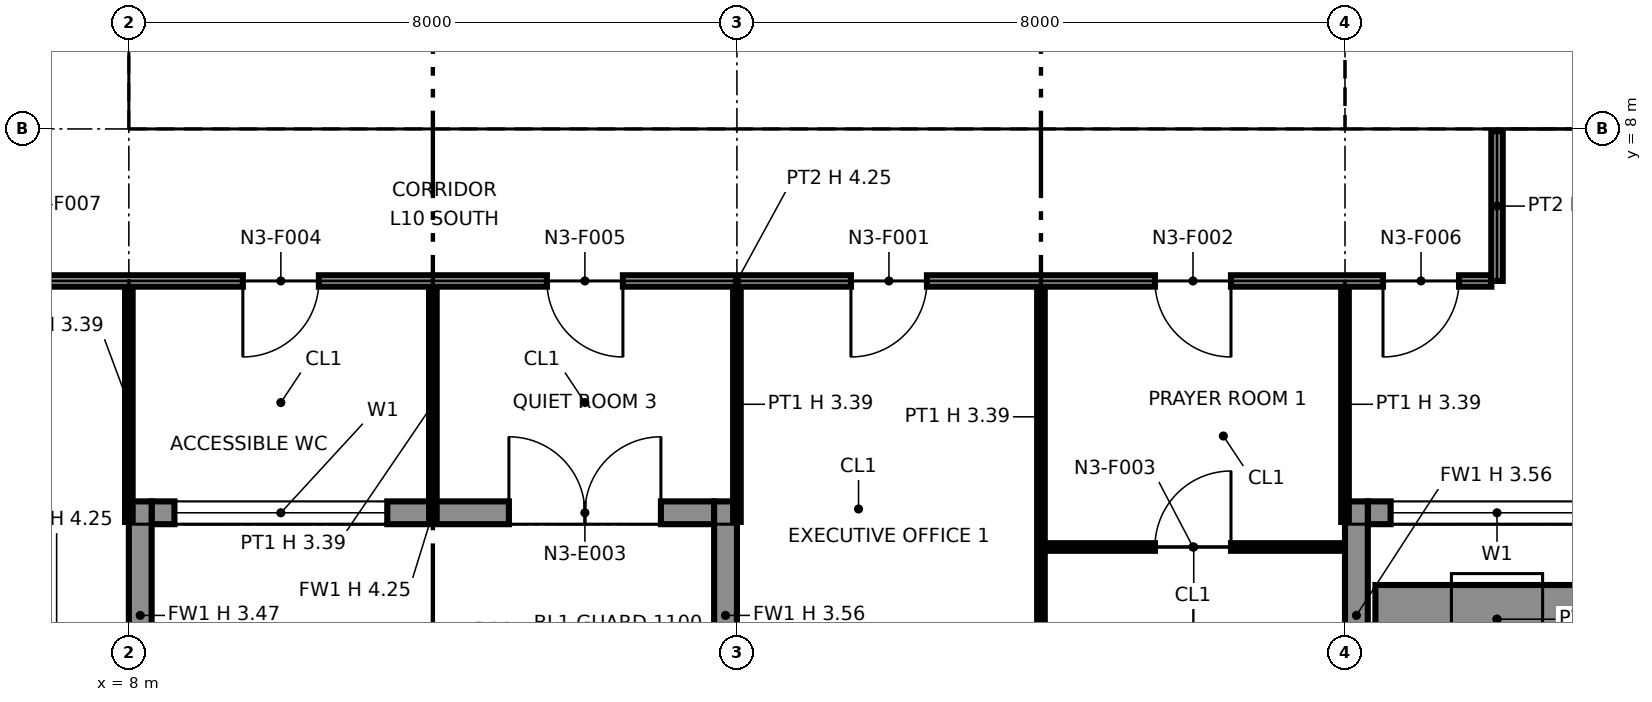
"""IFC4 building model, lengths in metres.
Left out: names, types, materials, properties, quantities, classifications, styles, units other than length and angle.
Written with IfcOpenShell. Run it as: python <this file> out.ifc"""

import sys

from ifc_helpers import new_model, si_unit, direction, frame, frame_2d, origin, origin_2d, place, context, subcontext, project, spatial, polyline, rectangle, i_section, outline, extrude, element, fill, save


model = new_model("IFC4")
c1 = context("Model", 3, precision=1e-05, world=origin(), true_north=direction((0.0, 1.0)))
c2 = subcontext(c1, "Body", "Model", "MODEL_VIEW")
j1 = project(units=[si_unit("LENGTHUNIT", "METRE"), si_unit("PLANEANGLEUNIT", "RADIAN")], contexts=[c1])
p1 = place(None, origin())
s1 = spatial("IfcSite", under=j1, at=p1, CompositionType="ELEMENT")
p2 = place(p1, origin())
s2 = spatial("IfcBuilding", under=s1, at=p2, CompositionType="ELEMENT")
p3 = place(p2, frame((0.0, 0.0, 61.2)))
s3 = spatial("IfcBuildingStorey", under=s2, at=p3, CompositionType="ELEMENT", Elevation=61.2)
for number, where, z_axis, x_axis in (
    (1, (8.0, 8.0, 0.0), (0.0, 0.0, 1.0), (1.0, 0.0, 0.0)),
    (2, (16.0, 8.0, 0.0), (0.0, 0.0, 1.0), (1.0, 0.0, 0.0)),
):
    element("IfcColumn", number, at=place(p3, frame(where, z_axis=z_axis, x_axis=x_axis)), inside=s3, PredefinedType="COLUMN", context=c2, shape_type="SweptSolid", body=[
        extrude(i_section(OverallWidth=0.419, OverallDepth=0.455, WebThickness=0.042, FlangeThickness=0.068, at=origin_2d()), origin(), (0.0, 0.0, 1.0), 4.25),
    ])
p4 = place(p3, frame((24.0, 8.0, 0.0), z_axis=(0.0, 0.0, 1.0), x_axis=(1.0, 0.0, 0.0)))
e3 = element("IfcColumn", 3, at=p4, inside=s3, PredefinedType="COLUMN", context=c2, shape_type="SweptSolid", body=[
    extrude(i_section(OverallWidth=0.424, OverallDepth=0.475, WebThickness=0.048, FlangeThickness=0.077, at=origin_2d()), origin(), (0.0, 0.0, 1.0), 4.25),
])
p5 = place(p3, frame((8.3, 2.95, 0.0), z_axis=(0.0, 0.0, 1.0), x_axis=(1.0, 0.0, 0.0)))
e4 = element("IfcWall", 4, at=p5, inside=s3, PredefinedType="SOLIDWALL", context=c2, shape_type="SweptSolid", body=[
    extrude(rectangle(XDim=7.4, YDim=0.3, at=frame_2d((3.7, 0.0))), origin(), (0.0, 0.0, 1.0), 4.25),
])
p6 = place(p5, frame((0.3, 0.0, 0.9)))
e5 = element("IfcOpeningElement", 5, at=p6, cuts=e4, PredefinedType="OPENING", context=c2, shape_type="SweptSolid", body=[
    extrude(rectangle(XDim=2.8, YDim=2.2, at=frame_2d((1.4, 1.1))), frame((0.0, 0.16, 0.0), z_axis=(0.0, -1.0, 0.0), x_axis=(1.0, 0.0, 0.0)), (0.0, 0.0, 1.0), 0.32),
])
p7 = place(p5, frame((4.7, 0.0, 0.0)))
e6 = element("IfcOpeningElement", 6, at=p7, cuts=e4, PredefinedType="OPENING", context=c2, shape_type="SweptSolid", body=[
    extrude(rectangle(XDim=2.0, YDim=2.4, at=frame_2d((1.0, 1.2))), frame((0.0, 0.16, 0.0), z_axis=(0.0, -1.0, 0.0), x_axis=(1.0, 0.0, 0.0)), (0.0, 0.0, 1.0), 0.32),
])
p8 = place(p3, frame((8.15, 0.1, 0.0), z_axis=(0.0, 0.0, 1.0), x_axis=(0.0, 1.0, 0.0)))
e7 = element("IfcWall", 7, at=p8, inside=s3, PredefinedType="SOLIDWALL", context=c2, shape_type="SweptSolid", body=[
    extrude(rectangle(XDim=3.0, YDim=0.3, at=frame_2d((1.5, 0.0))), origin(), (0.0, 0.0, 1.0), 3.469),
])
p9 = place(p3, frame((15.85, 0.1, 0.0), z_axis=(0.0, 0.0, 1.0), x_axis=(0.0, 1.0, 0.0)))
e8 = element("IfcWall", 8, at=p9, inside=s3, PredefinedType="SOLIDWALL", context=c2, shape_type="SweptSolid", body=[
    extrude(rectangle(XDim=3.0, YDim=0.3, at=frame_2d((1.5, 0.0))), origin(), (0.0, 0.0, 1.0), 3.556),
])
p10 = place(p3, frame((24.3, 2.95, 0.0), z_axis=(0.0, 0.0, 1.0), x_axis=(1.0, 0.0, 0.0)))
e9 = element("IfcWall", 9, at=p10, inside=s3, PredefinedType="SOLIDWALL", context=c2, shape_type="SweptSolid", body=[
    extrude(rectangle(XDim=7.4, YDim=0.3, at=frame_2d((3.7, 0.0))), origin(), (0.0, 0.0, 1.0), 4.25),
])
p11 = place(p10, frame((0.3, 0.0, 0.9)))
e10 = element("IfcOpeningElement", 10, at=p11, cuts=e9, PredefinedType="OPENING", context=c2, shape_type="SweptSolid", body=[
    extrude(rectangle(XDim=2.8, YDim=2.2, at=frame_2d((1.4, 1.1))), frame((0.0, 0.16, 0.0), z_axis=(0.0, -1.0, 0.0), x_axis=(1.0, 0.0, 0.0)), (0.0, 0.0, 1.0), 0.32),
])
p12 = place(p10, frame((4.7, 0.0, 0.0)))
e11 = element("IfcOpeningElement", 11, at=p12, cuts=e9, PredefinedType="OPENING", context=c2, shape_type="SweptSolid", body=[
    extrude(rectangle(XDim=2.0, YDim=2.4, at=frame_2d((1.0, 1.2))), frame((0.0, 0.16, 0.0), z_axis=(0.0, -1.0, 0.0), x_axis=(1.0, 0.0, 0.0)), (0.0, 0.0, 1.0), 0.32),
])
p13 = place(p3, frame((24.15, 0.1, 0.0), z_axis=(0.0, 0.0, 1.0), x_axis=(0.0, 1.0, 0.0)))
e12 = element("IfcWall", 12, at=p13, inside=s3, PredefinedType="SOLIDWALL", context=c2, shape_type="SweptSolid", body=[
    extrude(rectangle(XDim=3.0, YDim=0.3, at=frame_2d((1.5, 0.0))), origin(), (0.0, 0.0, 1.0), 3.556),
])
p14 = place(p3, frame((24.4, 1.55, 0.0), z_axis=(0.0, 0.0, 1.0), x_axis=(1.0, 0.0, 0.0)))
e13 = element("IfcWall", 13, at=p14, inside=s3, PredefinedType="SOLIDWALL", context=c2, shape_type="SweptSolid", body=[
    extrude(rectangle(XDim=3.2, YDim=0.9, at=frame_2d((1.6, 0.0))), origin(), (0.0, 0.0, 1.0), 0.6),
])
p15 = place(p3, frame((8.65, 8.75, 0.0), z_axis=(0.0, 0.0, 1.0), x_axis=(1.0, 0.0, 0.0)))
e14 = element("IfcWall", 14, at=p15, inside=s3, PredefinedType="PARTITIONING", context=c2, shape_type="SweptSolid", body=[
    extrude(outline(polyline([(0.0, 0.0), (14.7, 0.0), (14.7, 4.25), (7.469, 4.25), (7.469, 3.632), (7.231, 3.632), (7.23, 4.25), (0.0, 4.25), (0.0, 0.0)])), frame((0.0, 0.1, 0.0), z_axis=(0.0, -1.0, 0.0), x_axis=(1.0, 0.0, 0.0)), (0.0, 0.0, 1.0), 0.2),
])
p16 = place(p15, frame((1.3, 0.0, 0.0)))
e15 = element("IfcOpeningElement", 15, at=p16, cuts=e14, PredefinedType="OPENING", context=c2, shape_type="SweptSolid", body=[
    extrude(rectangle(XDim=1.4, YDim=2.1, at=frame_2d((0.7, 1.05))), frame((0.0, 0.11, 0.0), z_axis=(0.0, -1.0, 0.0), x_axis=(1.0, 0.0, 0.0)), (0.0, 0.0, 1.0), 0.22),
])
p17 = place(p15, frame((4.6, 0.0, 0.0)))
e16 = element("IfcOpeningElement", 16, at=p17, cuts=e14, PredefinedType="OPENING", context=c2, shape_type="SweptSolid", body=[
    extrude(rectangle(XDim=1.4, YDim=2.1, at=frame_2d((0.7, 1.05))), frame((0.0, 0.11, 0.0), z_axis=(0.0, -1.0, 0.0), x_axis=(1.0, 0.0, 0.0)), (0.0, 0.0, 1.0), 0.22),
])
p18 = place(p15, frame((10.4, 0.0, 0.0)))
e17 = element("IfcOpeningElement", 17, at=p18, cuts=e14, PredefinedType="OPENING", context=c2, shape_type="SweptSolid", body=[
    extrude(rectangle(XDim=1.2, YDim=2.1, at=frame_2d((0.6, 1.05))), frame((0.0, 0.11, 0.0), z_axis=(0.0, -1.0, 0.0), x_axis=(1.0, 0.0, 0.0)), (0.0, 0.0, 1.0), 0.22),
])
p19 = place(p3, frame((8.75, 8.85, 0.0), z_axis=(0.0, 0.0, 1.0), x_axis=(0.0, 1.0, 0.0)))
e18 = element("IfcWall", 18, at=p19, inside=s3, PredefinedType="PARTITIONING", context=c2, shape_type="SweptSolid", body=[
    extrude(outline(polyline([(0.0, 0.0), (14.3, 0.0), (14.3, 4.25), (10.231, 4.25), (10.23, 3.789), (10.07, 3.789), (10.069, 4.25), (7.27, 4.25), (7.269, 3.632), (7.031, 3.632), (7.031, 4.25), (0.0, 4.25), (0.0, 0.0)])), frame((0.0, 0.1, 0.0), z_axis=(0.0, -1.0, 0.0), x_axis=(1.0, 0.0, 0.0)), (0.0, 0.0, 1.0), 0.2),
])
p20 = place(p19, frame((8.3, 0.0, 0.0)))
e19 = element("IfcOpeningElement", 19, at=p20, cuts=e18, PredefinedType="OPENING", context=c2, shape_type="SweptSolid", body=[
    extrude(rectangle(XDim=1.8, YDim=2.1, at=frame_2d((0.9, 1.05))), frame((0.0, 0.11, 0.0), z_axis=(0.0, -1.0, 0.0), x_axis=(1.0, 0.0, 0.0)), (0.0, 0.0, 1.0), 0.22),
])
p21 = place(p3, frame((12.4, 8.85, 0.0), z_axis=(0.0, 0.0, 1.0), x_axis=(0.0, 1.0, 0.0)))
e20 = element("IfcWall", 20, at=p21, inside=s3, PredefinedType="PARTITIONING", context=c2, shape_type="SweptSolid", body=[
    extrude(rectangle(XDim=6.85, YDim=0.2, at=frame_2d((3.425, 0.0))), origin(), (0.0, 0.0, 1.0), 4.25),
])
p22 = place(p3, frame((15.85, 8.85, 0.0), z_axis=(0.0, 0.0, 1.0), x_axis=(0.0, 1.0, 0.0)))
e21 = element("IfcWall", 21, at=p22, inside=s3, PredefinedType="PARTITIONING", context=c2, shape_type="SweptSolid", body=[
    extrude(rectangle(XDim=1.55, YDim=0.9, at=frame_2d((0.775, 0.0))), origin(), (0.0, 0.0, 1.0), 3.632),
])
p23 = place(p22, frame((0.3, 0.0, 0.0)))
e22 = element("IfcOpeningElement", 22, at=p23, cuts=e21, PredefinedType="OPENING", context=c2, shape_type="SweptSolid", body=[
    extrude(rectangle(XDim=1.1, YDim=2.1, at=frame_2d((0.55, 1.05))), frame((0.0, 0.46, 0.0), z_axis=(0.0, -1.0, 0.0), x_axis=(1.0, 0.0, 0.0)), (0.0, 0.0, 1.0), 0.92),
])
p24 = place(p3, frame((23.25, 8.85, 0.0), z_axis=(0.0, 0.0, 1.0), x_axis=(0.0, 1.0, 0.0)))
e23 = element("IfcWall", 23, at=p24, inside=s3, PredefinedType="PARTITIONING", context=c2, shape_type="SweptSolid", body=[
    extrude(outline(polyline([(0.0, 0.0), (14.3, 0.0), (14.3, 4.25), (11.231, 4.25), (11.23, 3.789), (11.07, 3.789), (11.069, 4.25), (7.27, 4.25), (7.269, 3.632), (7.031, 3.632), (7.031, 4.25), (1.231, 4.25), (1.23, 3.789), (1.07, 3.789), (1.069, 4.25), (0.0, 4.25), (0.0, 0.0)])), frame((0.0, 0.1, 0.0), z_axis=(0.0, -1.0, 0.0), x_axis=(1.0, 0.0, 0.0)), (0.0, 0.0, 1.0), 0.2),
])
p25 = place(p24, frame((8.3, 0.0, 0.0)))
e24 = element("IfcOpeningElement", 24, at=p25, cuts=e23, PredefinedType="OPENING", context=c2, shape_type="SweptSolid", body=[
    extrude(rectangle(XDim=1.8, YDim=2.1, at=frame_2d((0.9, 1.05))), frame((0.0, 0.11, 0.0), z_axis=(0.0, -1.0, 0.0), x_axis=(1.0, 0.0, 0.0)), (0.0, 0.0, 1.0), 0.22),
])
p26 = place(p3, frame((24.65, 8.75, 0.0), z_axis=(0.0, 0.0, 1.0), x_axis=(1.0, 0.0, 0.0)))
e25 = element("IfcWall", 25, at=p26, inside=s3, PredefinedType="PARTITIONING", context=c2, shape_type="SweptSolid", body=[
    extrude(outline(polyline([(0.0, 0.0), (14.7, 0.0), (14.7, 4.25), (7.469, 4.25), (7.469, 3.632), (7.231, 3.632), (7.23, 4.25), (0.0, 4.25), (0.0, 0.0)])), frame((0.0, 0.1, 0.0), z_axis=(0.0, -1.0, 0.0), x_axis=(1.0, 0.0, 0.0)), (0.0, 0.0, 1.0), 0.2),
])
p27 = place(p3, frame((24.75, 8.85, 0.0), z_axis=(0.0, 0.0, 1.0), x_axis=(0.0, 1.0, 0.0)))
e26 = element("IfcWall", 26, at=p27, inside=s3, PredefinedType="PARTITIONING", context=c2, shape_type="SweptSolid", body=[
    extrude(outline(polyline([(0.0, 0.0), (6.3, 0.0), (6.3, 4.25), (3.231, 4.25), (3.23, 3.789), (3.07, 3.789), (3.069, 4.25), (0.0, 4.25), (0.0, 0.0)])), frame((0.0, 0.1, 0.0), z_axis=(0.0, -1.0, 0.0), x_axis=(1.0, 0.0, 0.0)), (0.0, 0.0, 1.0), 0.2),
])
p28 = place(p3, frame((20.0, 0.13, 0.0), z_axis=(0.0, 0.0, 1.0), x_axis=(0.0, 1.0, 0.0)))
e27 = element("IfcWall", 27, at=p28, inside=s3, PredefinedType="PARTITIONING", context=c2, shape_type="SweptSolid", body=[
    extrude(rectangle(XDim=2.32, YDim=0.1, at=frame_2d((1.16, 0.0))), origin(), (0.0, 0.0, 1.0), 4.25),
])
p29 = place(p3, frame((20.05, 2.5, 0.0), z_axis=(0.0, 0.0, 1.0), x_axis=(1.0, 0.0, 0.0)))
e28 = element("IfcWall", 28, at=p29, inside=s3, PredefinedType="PARTITIONING", context=c2, shape_type="SweptSolid", body=[
    extrude(rectangle(XDim=3.92, YDim=0.1, at=frame_2d((1.96, 0.0))), origin(), (0.0, 0.0, 1.0), 4.25),
])
p30 = place(p29, frame((1.45, 0.0, 0.0)))
e29 = element("IfcOpeningElement", 29, at=p30, cuts=e28, PredefinedType="OPENING", context=c2, shape_type="SweptSolid", body=[
    extrude(rectangle(XDim=1.0, YDim=2.1, at=frame_2d((0.5, 1.05))), frame((0.0, 0.06, 0.0), z_axis=(0.0, -1.0, 0.0), x_axis=(1.0, 0.0, 0.0)), (0.0, 0.0, 1.0), 0.12),
])
p31 = place(p3, frame((20.0, 2.5, 0.0), z_axis=(0.0, 0.0, 1.0), x_axis=(0.0, 1.0, 0.0)))
e30 = element("IfcWall", 30, at=p31, inside=s3, PredefinedType="PARTITIONING", context=c2, shape_type="SweptSolid", body=[
    extrude(rectangle(XDim=3.425, YDim=0.1, at=frame_2d((1.712, 0.0))), origin(), (0.0, 0.0, 1.0), 3.391),
])
for number, where, z_axis, x_axis in (
    (31, (8.0, 2.83, 0.0), (0.0, 0.0, 1.0), (0.0, 1.0, 0.0)),
    (32, (12.0, 2.83, 0.0), (0.0, 0.0, 1.0), (0.0, 1.0, 0.0)),
    (33, (16.0, 2.83, 0.0), (0.0, 0.0, 1.0), (0.0, 1.0, 0.0)),
    (34, (24.0, 2.83, 0.0), (0.0, 0.0, 1.0), (0.0, 1.0, 0.0)),
):
    element("IfcWall", number, at=place(p3, frame(where, z_axis=z_axis, x_axis=x_axis)), inside=s3, PredefinedType="PARTITIONING", context=c2, shape_type="SweptSolid", body=[
        extrude(rectangle(XDim=3.095, YDim=0.1, at=frame_2d((1.547, 0.0))), origin(), (0.0, 0.0, 1.0), 3.391),
    ])
p32 = place(p3, frame((6.075, 6.0, 0.0), z_axis=(0.0, 0.0, 1.0), x_axis=(1.0, 0.0, 0.0)))
e35 = element("IfcWall", 35, at=p32, inside=s3, PredefinedType="PARTITIONING", context=c2, shape_type="SweptSolid", body=[
    extrude(rectangle(XDim=19.85, YDim=0.15, at=frame_2d((9.925, 0.0))), origin(), (0.0, 0.0, 1.0), 4.25),
])
p33 = place(p32, frame((12.425, 0.0, 0.0), z_axis=(0.0, 0.0, 1.0), x_axis=(-1.0, 0.0, 0.0)))
e36 = element("IfcOpeningElement", 36, at=p33, cuts=e35, PredefinedType="OPENING", context=c2, shape_type="SweptSolid", body=[
    extrude(rectangle(XDim=1.0, YDim=2.1, at=frame_2d((0.5, 1.05))), frame((0.0, 0.085, 0.0), z_axis=(0.0, -1.0, 0.0), x_axis=(1.0, 0.0, 0.0)), (0.0, 0.0, 1.0), 0.17),
])
p34 = place(p32, frame((16.425, 0.0, 0.0), z_axis=(0.0, 0.0, 1.0), x_axis=(-1.0, 0.0, 0.0)))
e37 = element("IfcOpeningElement", 37, at=p34, cuts=e35, PredefinedType="OPENING", context=c2, shape_type="SweptSolid", body=[
    extrude(rectangle(XDim=1.0, YDim=2.1, at=frame_2d((0.5, 1.05))), frame((0.0, 0.085, 0.0), z_axis=(0.0, -1.0, 0.0), x_axis=(1.0, 0.0, 0.0)), (0.0, 0.0, 1.0), 0.17),
])
p35 = place(p32, frame((4.425, 0.0, 0.0), z_axis=(0.0, 0.0, 1.0), x_axis=(-1.0, 0.0, 0.0)))
e38 = element("IfcOpeningElement", 38, at=p35, cuts=e35, PredefinedType="OPENING", context=c2, shape_type="SweptSolid", body=[
    extrude(rectangle(XDim=1.0, YDim=2.1, at=frame_2d((0.5, 1.05))), frame((0.0, 0.085, 0.0), z_axis=(0.0, -1.0, 0.0), x_axis=(1.0, 0.0, 0.0)), (0.0, 0.0, 1.0), 0.17),
])
p36 = place(p32, frame((8.425, 0.0, 0.0), z_axis=(0.0, 0.0, 1.0), x_axis=(-1.0, 0.0, 0.0)))
e39 = element("IfcOpeningElement", 39, at=p36, cuts=e35, PredefinedType="OPENING", context=c2, shape_type="SweptSolid", body=[
    extrude(rectangle(XDim=1.0, YDim=2.1, at=frame_2d((0.5, 1.05))), frame((0.0, 0.085, 0.0), z_axis=(0.0, -1.0, 0.0), x_axis=(1.0, 0.0, 0.0)), (0.0, 0.0, 1.0), 0.17),
])
p37 = place(p32, frame((19.425, 0.0, 0.0), z_axis=(0.0, 0.0, 1.0), x_axis=(-1.0, 0.0, 0.0)))
e40 = element("IfcOpeningElement", 40, at=p37, cuts=e35, PredefinedType="OPENING", context=c2, shape_type="SweptSolid", body=[
    extrude(rectangle(XDim=1.0, YDim=2.1, at=frame_2d((0.5, 1.05))), frame((0.0, 0.085, 0.0), z_axis=(0.0, -1.0, 0.0), x_axis=(1.0, 0.0, 0.0)), (0.0, 0.0, 1.0), 0.17),
])
p38 = place(p3, frame((26.0, 6.0, 0.0), z_axis=(0.0, 0.0, 1.0), x_axis=(0.0, 1.0, 0.0)))
e41 = element("IfcWall", 41, at=p38, inside=s3, PredefinedType="PARTITIONING", context=c2, shape_type="SweptSolid", body=[
    extrude(rectangle(XDim=1.97, YDim=0.15, at=frame_2d((0.985, 0.0))), origin(), (0.0, 0.0, 1.0), 4.25),
])
p39 = place(p6, origin())
e42 = element("IfcWindow", 42, at=p39, inside=s3, PartitioningType="SINGLE_PANEL", PredefinedType="WINDOW", context=c2, shape_type="SweptSolid", body=[
    extrude(rectangle(XDim=2.8, YDim=2.2, at=frame_2d((1.4, 1.1))), frame((0.0, 0.03, 0.0), z_axis=(0.0, -1.0, 0.0), x_axis=(1.0, 0.0, 0.0)), (0.0, 0.0, 1.0), 0.06),
])
fill(e5, e42)
p40 = place(p7, origin())
e43 = element("IfcDoor", 43, at=p40, inside=s3, OperationType="DOUBLE_DOOR_SINGLE_SWING", PredefinedType="DOOR", context=c2, shape_type="SweptSolid", body=[
    extrude(rectangle(XDim=2.0, YDim=2.4, at=frame_2d((1.0, 1.2))), frame((0.0, 0.025, 0.0), z_axis=(0.0, -1.0, 0.0), x_axis=(1.0, 0.0, 0.0)), (0.0, 0.0, 1.0), 0.05),
])
fill(e6, e43)
p41 = place(p11, origin())
e44 = element("IfcWindow", 44, at=p41, inside=s3, PartitioningType="SINGLE_PANEL", PredefinedType="WINDOW", context=c2, shape_type="SweptSolid", body=[
    extrude(rectangle(XDim=2.8, YDim=2.2, at=frame_2d((1.4, 1.1))), frame((0.0, 0.03, 0.0), z_axis=(0.0, -1.0, 0.0), x_axis=(1.0, 0.0, 0.0)), (0.0, 0.0, 1.0), 0.06),
])
fill(e10, e44)
p42 = place(p16, origin())
e45 = element("IfcDoor", 45, at=p42, inside=s3, OperationType="DOUBLE_DOOR_SINGLE_SWING", PredefinedType="NOTDEFINED", context=c2, shape_type="SweptSolid", body=[
    extrude(rectangle(XDim=1.4, YDim=2.1, at=frame_2d((0.7, 1.05))), frame((0.0, 0.025, 0.0), z_axis=(0.0, -1.0, 0.0), x_axis=(1.0, 0.0, 0.0)), (0.0, 0.0, 1.0), 0.05),
])
fill(e15, e45)
p43 = place(p17, origin())
e46 = element("IfcDoor", 46, at=p43, inside=s3, OperationType="DOUBLE_DOOR_SINGLE_SWING", PredefinedType="NOTDEFINED", context=c2, shape_type="SweptSolid", body=[
    extrude(rectangle(XDim=1.4, YDim=2.1, at=frame_2d((0.7, 1.05))), frame((0.0, 0.025, 0.0), z_axis=(0.0, -1.0, 0.0), x_axis=(1.0, 0.0, 0.0)), (0.0, 0.0, 1.0), 0.05),
])
fill(e16, e46)
p44 = place(p18, origin())
e47 = element("IfcDoor", 47, at=p44, inside=s3, OperationType="SINGLE_SWING_LEFT", PredefinedType="NOTDEFINED", context=c2, shape_type="SweptSolid", body=[
    extrude(rectangle(XDim=1.2, YDim=2.1, at=frame_2d((0.6, 1.05))), frame((0.0, 0.025, 0.0), z_axis=(0.0, -1.0, 0.0), x_axis=(1.0, 0.0, 0.0)), (0.0, 0.0, 1.0), 0.05),
])
fill(e17, e47)
p45 = place(p33, origin())
e48 = element("IfcDoor", 48, at=p45, inside=s3, OperationType="SINGLE_SWING_RIGHT", PredefinedType="DOOR", context=c2, shape_type="SweptSolid", body=[
    extrude(rectangle(XDim=1.0, YDim=2.1, at=frame_2d((0.5, 1.05))), frame((0.0, 0.025, 0.0), z_axis=(0.0, -1.0, 0.0), x_axis=(1.0, 0.0, 0.0)), (0.0, 0.0, 1.0), 0.05),
])
fill(e36, e48)
p46 = place(p34, origin())
e49 = element("IfcDoor", 49, at=p46, inside=s3, OperationType="SINGLE_SWING_LEFT", PredefinedType="DOOR", context=c2, shape_type="SweptSolid", body=[
    extrude(rectangle(XDim=1.0, YDim=2.1, at=frame_2d((0.5, 1.05))), frame((0.0, 0.025, 0.0), z_axis=(0.0, -1.0, 0.0), x_axis=(1.0, 0.0, 0.0)), (0.0, 0.0, 1.0), 0.05),
])
fill(e37, e49)
p47 = place(p30, origin())
e50 = element("IfcDoor", 50, at=p47, inside=s3, OperationType="SINGLE_SWING_RIGHT", PredefinedType="DOOR", context=c2, shape_type="SweptSolid", body=[
    extrude(rectangle(XDim=1.0, YDim=2.1, at=frame_2d((0.5, 1.05))), frame((0.0, 0.025, 0.0), z_axis=(0.0, -1.0, 0.0), x_axis=(1.0, 0.0, 0.0)), (0.0, 0.0, 1.0), 0.05),
])
fill(e29, e50)
p48 = place(p35, origin())
e51 = element("IfcDoor", 51, at=p48, inside=s3, OperationType="SINGLE_SWING_RIGHT", PredefinedType="DOOR", context=c2, shape_type="SweptSolid", body=[
    extrude(rectangle(XDim=1.0, YDim=2.1, at=frame_2d((0.5, 1.05))), frame((0.0, 0.025, 0.0), z_axis=(0.0, -1.0, 0.0), x_axis=(1.0, 0.0, 0.0)), (0.0, 0.0, 1.0), 0.05),
])
fill(e38, e51)
p49 = place(p36, origin())
e52 = element("IfcDoor", 52, at=p49, inside=s3, OperationType="SINGLE_SWING_LEFT", PredefinedType="DOOR", context=c2, shape_type="SweptSolid", body=[
    extrude(rectangle(XDim=1.0, YDim=2.1, at=frame_2d((0.5, 1.05))), frame((0.0, 0.025, 0.0), z_axis=(0.0, -1.0, 0.0), x_axis=(1.0, 0.0, 0.0)), (0.0, 0.0, 1.0), 0.05),
])
fill(e39, e52)
p50 = place(p37, origin())
e53 = element("IfcDoor", 53, at=p50, inside=s3, OperationType="SINGLE_SWING_RIGHT", PredefinedType="DOOR", context=c2, shape_type="SweptSolid", body=[
    extrude(rectangle(XDim=1.0, YDim=2.1, at=frame_2d((0.5, 1.05))), frame((0.0, 0.025, 0.0), z_axis=(0.0, -1.0, 0.0), x_axis=(1.0, 0.0, 0.0)), (0.0, 0.0, 1.0), 0.05),
])
fill(e40, e53)
save(model, sys.argv[1])
